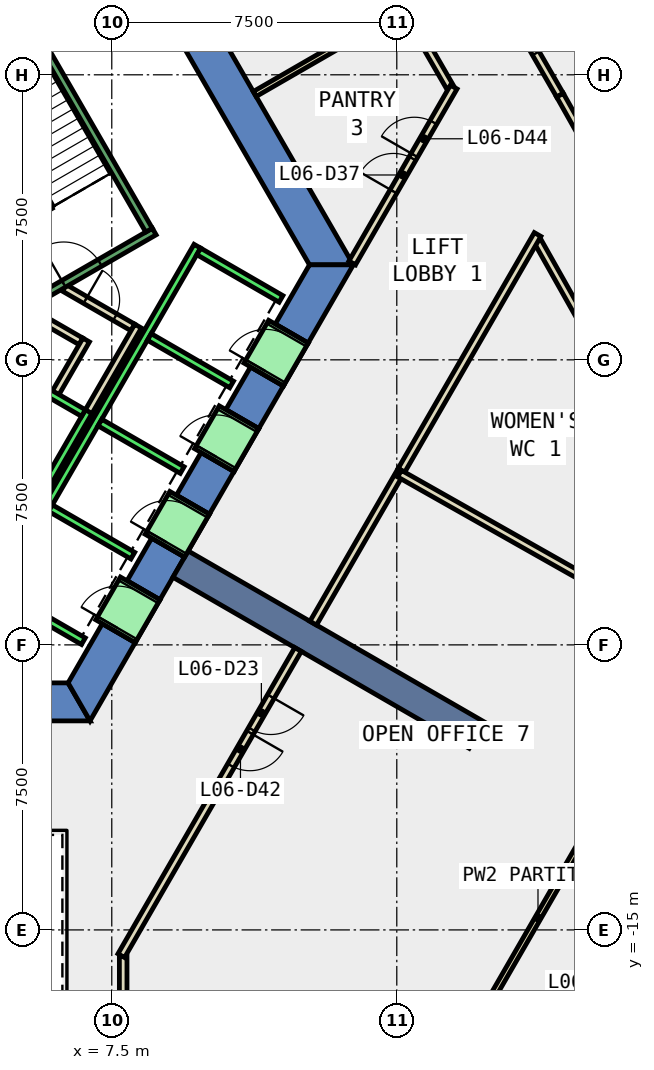
"""IFC4 building model, lengths in metres.
Left out: names, types, materials, properties, quantities, classifications, styles, units other than length and angle.
Written with IfcOpenShell. Run it as: python <this file> out.ifc"""

import sys

from ifc_helpers import new_model, si_unit, direction, frame, frame_2d, origin, place, context, subcontext, project, spatial, polyline, rectangle, outline, extrude, element, fill, save


model = new_model("IFC4")
c1 = context("Model", 3, precision=1e-05, world=origin(), true_north=direction((0.0, 1.0)))
c2 = subcontext(c1, "Body", "Model", "MODEL_VIEW")
j1 = project(units=[si_unit("LENGTHUNIT", "METRE"), si_unit("PLANEANGLEUNIT", "RADIAN")], contexts=[c1])
p1 = place(None, origin())
s1 = spatial("IfcSite", under=j1, at=p1, CompositionType="ELEMENT")
p2 = place(p1, origin())
s2 = spatial("IfcBuilding", under=s1, at=p2, CompositionType="ELEMENT")
p3 = place(p2, frame((0.0, 0.0, 35.0)))
s3 = spatial("IfcBuildingStorey", under=s2, at=p3, CompositionType="ELEMENT", Elevation=35.0)
p4 = place(p3, frame((0.0, 0.0, -0.6)))
e1 = element("IfcWall", 1, at=p4, inside=s3, PredefinedType="SHEAR", context=c2, shape_type="SweptSolid", body=[
    extrude(outline(polyline([(8.517, 11.748), (7.651, 11.248), (12.702, 2.5), (13.856, 2.5), (8.517, 11.748)])), origin(), (0.0, 0.0, 1.0), 4.4),
])
p5 = place(p3, frame((0.0, 0.0, -0.6)))
e2 = element("IfcWall", 2, at=p5, inside=s3, PredefinedType="SHEAR", context=c2, shape_type="SweptSolid", body=[
    extrude(outline(polyline([(5.75, -8.5), (5.75, -9.5), (6.928, -9.5), (6.351, -8.5), (5.75, -8.5)])), origin(), (0.0, 0.0, 1.0), 4.4),
])
p6 = place(p3, frame((0.0, 0.0, -0.6)))
e3 = element("IfcWall", 3, at=p6, inside=s3, PredefinedType="SHEAR", context=c2, shape_type="SweptSolid", body=[
    extrude(outline(polyline([(8.117, -7.44), (7.252, -6.94), (6.351, -8.5), (6.928, -9.5), (8.117, -7.44)])), origin(), (0.0, 0.0, 1.0), 4.4),
])
p7 = place(p3, frame((0.0, 0.0, -0.6)))
e4 = element("IfcWall", 4, at=p7, inside=s3, PredefinedType="SHEAR", context=c2, shape_type="SweptSolid", body=[
    extrude(outline(polyline([(9.417, -5.189), (8.551, -4.689), (7.902, -5.814), (8.767, -6.314), (9.417, -5.189)])), origin(), (0.0, 0.0, 1.0), 4.4),
])
p8 = place(p3, frame((0.0, 0.0, -0.6)))
e5 = element("IfcWall", 5, at=p8, inside=s3, PredefinedType="SHEAR", context=c2, shape_type="SweptSolid", body=[
    extrude(outline(polyline([(10.717, -2.937), (9.851, -2.437), (9.201, -3.563), (10.067, -4.063), (10.717, -2.937)])), origin(), (0.0, 0.0, 1.0), 4.4),
])
p9 = place(p3, frame((0.0, 0.0, -0.6)))
e6 = element("IfcWall", 6, at=p9, inside=s3, PredefinedType="SHEAR", context=c2, shape_type="SweptSolid", body=[
    extrude(outline(polyline([(12.017, -0.686), (11.151, -0.186), (10.501, -1.311), (11.367, -1.811), (12.017, -0.686)])), origin(), (0.0, 0.0, 1.0), 4.4),
])
p10 = place(p3, frame((0.0, 0.0, -0.6)))
e7 = element("IfcWall", 7, at=p10, inside=s3, PredefinedType="SHEAR", context=c2, shape_type="SweptSolid", body=[
    extrude(outline(polyline([(11.801, 0.94), (12.667, 0.44), (13.856, 2.5), (12.702, 2.5), (11.801, 0.94)])), origin(), (0.0, 0.0, 1.0), 4.4),
])
p11 = place(p3, frame((0.0, 0.0, 3.6)))
e8 = element("IfcWall", 8, at=p11, inside=s3, PredefinedType="SHEAR", context=c2, shape_type="SweptSolid", body=[
    extrude(outline(polyline([(8.767, -6.314), (7.902, -5.814), (7.252, -6.94), (8.117, -7.44), (8.767, -6.314)])), origin(), (0.0, 0.0, 1.0), 0.2),
])
p12 = place(p3, frame((0.0, 0.0, 3.6)))
e9 = element("IfcWall", 9, at=p12, inside=s3, PredefinedType="SHEAR", context=c2, shape_type="SweptSolid", body=[
    extrude(outline(polyline([(10.067, -4.063), (9.201, -3.563), (8.551, -4.689), (9.417, -5.189), (10.067, -4.063)])), origin(), (0.0, 0.0, 1.0), 0.2),
])
p13 = place(p3, frame((0.0, 0.0, 3.6)))
e10 = element("IfcWall", 10, at=p13, inside=s3, PredefinedType="SHEAR", context=c2, shape_type="SweptSolid", body=[
    extrude(outline(polyline([(11.367, -1.811), (10.501, -1.311), (9.851, -2.437), (10.717, -2.937), (11.367, -1.811)])), origin(), (0.0, 0.0, 1.0), 0.2),
])
p14 = place(p3, frame((0.0, 0.0, 3.6)))
e11 = element("IfcWall", 11, at=p14, inside=s3, PredefinedType="SHEAR", context=c2, shape_type="SweptSolid", body=[
    extrude(outline(polyline([(12.667, 0.44), (11.801, 0.94), (11.151, -0.186), (12.017, -0.686), (12.667, 0.44)])), origin(), (0.0, 0.0, 1.0), 0.2),
])
p15 = place(p3, frame((9.31, -5.375, -0.6), z_axis=(0.0, 0.0, 1.0), x_axis=(0.866017533419, -0.500013631625, 0.0)))
e12 = element("IfcWall", 12, at=p15, inside=s3, PredefinedType="SHEAR", context=c2, shape_type="SweptSolid", body=[
    extrude(rectangle(XDim=9.0, YDim=0.8, at=frame_2d((4.5, 0.0))), origin(), (0.0, 0.0, 1.0), 4.4),
])
p16 = place(p3, frame((16.399, 7.178, 0.0), z_axis=(0.0, 0.0, 1.0), x_axis=(-0.499873332494, 0.866098522953, 0.0)))
e13 = element("IfcWall", 13, at=p16, inside=s3, PredefinedType="PARTITIONING", context=c2, shape_type="SweptSolid", body=[
    extrude(rectangle(XDim=2.334, YDim=0.2, at=frame_2d((1.167, 0.0))), origin(), (0.0, 0.0, 1.0), 3.8),
])
p17 = place(p3, frame((20.751, -0.505, 0.0), z_axis=(0.0, 0.0, 1.0), x_axis=(-0.491284712602, 0.870999041999, 0.0)))
e14 = element("IfcWall", 14, at=p17, inside=s3, PredefinedType="PARTITIONING", context=c2, shape_type="SweptSolid", body=[
    extrude(rectangle(XDim=4.166, YDim=0.2, at=frame_2d((2.083, 0.0))), origin(), (0.0, 0.0, 1.0), 3.8),
])
p18 = place(p3, frame((17.524, 10.031, 0.0), z_axis=(0.0, 0.0, 1.0), x_axis=(0.499861717316, -0.86610522661, 0.0)))
e15 = element("IfcWall", 15, at=p18, inside=s3, PredefinedType="PARTITIONING", context=c2, shape_type="SweptSolid", body=[
    extrude(rectangle(XDim=3.541, YDim=0.2, at=frame_2d((1.771, 0.0))), origin(), (0.0, 0.0, 1.0), 3.8),
])
p19 = place(p18, frame((1.27, 0.0, 0.0)))
e16 = element("IfcOpeningElement", 16, at=p19, cuts=e15, PredefinedType="OPENING", context=c2, shape_type="SweptSolid", body=[
    extrude(rectangle(XDim=1.0, YDim=2.1, at=frame_2d((0.5, 1.05))), frame((0.0, 0.11, 0.0), z_axis=(0.0, -1.0, 0.0), x_axis=(1.0, 0.0, 0.0)), (0.0, 0.0, 1.0), 0.22),
])
p20 = place(p3, frame((19.294, 6.964, 0.0), z_axis=(0.0, 0.0, 1.0), x_axis=(0.491148159943, -0.871076050058, 0.0)))
e17 = element("IfcWall", 17, at=p20, inside=s3, PredefinedType="PARTITIONING", context=c2, shape_type="SweptSolid", body=[
    extrude(rectangle(XDim=3.541, YDim=0.2, at=frame_2d((1.771, 0.0))), origin(), (0.0, 0.0, 1.0), 3.8),
])
p21 = place(p3, frame((5.499, 1.172, 0.0), z_axis=(0.0, 0.0, 1.0), x_axis=(0.866333505267, -0.499465972466, 0.0)))
e18 = element("IfcWall", 18, at=p21, inside=s3, PredefinedType="PARTITIONING", context=c2, shape_type="SweptSolid", body=[
    extrude(rectangle(XDim=1.374, YDim=0.2, at=frame_2d((0.687, 0.0))), origin(), (0.0, 0.0, 1.0), 3.8),
])
p22 = place(p3, frame((6.826, 0.522, 0.0), z_axis=(0.0, 0.0, 1.0), x_axis=(-0.500016722714, -0.866015748706, 0.0)))
e19 = element("IfcWall", 19, at=p22, inside=s3, PredefinedType="PARTITIONING", context=c2, shape_type="SweptSolid", body=[
    extrude(rectangle(XDim=1.7, YDim=0.2, at=frame_2d((0.85, 0.0))), origin(), (0.0, 0.0, 1.0), 3.8),
])
p23 = place(p3, frame((6.25, 1.894, 0.0), z_axis=(0.0, 0.0, 1.0), x_axis=(0.866043184279, -0.499969202016, 0.0)))
e20 = element("IfcWall", 20, at=p23, inside=s3, PredefinedType="PARTITIONING", context=c2, shape_type="SweptSolid", body=[
    extrude(rectangle(XDim=2.084, YDim=0.2, at=frame_2d((1.042, 0.0))), origin(), (0.0, 0.0, 1.0), 3.8),
])
p24 = place(p23, frame((0.642, 0.0, 0.0)))
e21 = element("IfcOpeningElement", 21, at=p24, cuts=e20, PredefinedType="OPENING", context=c2, shape_type="SweptSolid", body=[
    extrude(rectangle(XDim=0.9, YDim=2.1, at=frame_2d((0.45, 1.05))), frame((0.0, 0.11, 0.0), z_axis=(0.0, -1.0, 0.0), x_axis=(1.0, 0.0, 0.0)), (0.0, 0.0, 1.0), 0.22),
])
p25 = place(p3, frame((8.192, 0.888, 0.0), z_axis=(0.0, 0.0, 1.0), x_axis=(-0.499940625693, -0.866059680843, 0.0)))
e22 = element("IfcWall", 22, at=p25, inside=s3, PredefinedType="PARTITIONING", context=c2, shape_type="SweptSolid", body=[
    extrude(rectangle(XDim=2.68, YDim=0.2, at=frame_2d((1.34, 0.0))), origin(), (0.0, 0.0, 1.0), 3.8),
])
p26 = place(p3, frame((15.281, 9.315, 0.0), z_axis=(0.0, 0.0, 1.0), x_axis=(-0.86601742213, -0.500013824377, 0.0)))
e23 = element("IfcWall", 23, at=p26, inside=s3, PredefinedType="PARTITIONING", context=c2, shape_type="SweptSolid", body=[
    extrude(rectangle(XDim=4.642, YDim=0.15, at=frame_2d((2.321, 0.0))), origin(), (0.0, 0.0, 1.0), 3.8),
])
p27 = place(p3, frame((13.827, 2.55, 0.0), z_axis=(0.0, 0.0, 1.0), x_axis=(0.50002563942, 0.866010600352, 0.0)))
e24 = element("IfcWall", 24, at=p27, inside=s3, PredefinedType="PARTITIONING", context=c2, shape_type="SweptSolid", body=[
    extrude(rectangle(XDim=5.344, YDim=0.2, at=frame_2d((2.672, 0.0))), origin(), (0.0, 0.0, 1.0), 3.8),
])
p28 = place(p27, frame((2.172, 0.0, 0.0)))
e25 = element("IfcOpeningElement", 25, at=p28, cuts=e24, PredefinedType="OPENING", context=c2, shape_type="SweptSolid", body=[
    extrude(rectangle(XDim=1.0, YDim=2.1, at=frame_2d((0.5, 1.05))), frame((0.0, 0.11, 0.0), z_axis=(0.0, -1.0, 0.0), x_axis=(1.0, 0.0, 0.0)), (0.0, 0.0, 1.0), 0.22),
])
p29 = place(p27, frame((3.272, 0.0, 0.0)))
e26 = element("IfcOpeningElement", 26, at=p29, cuts=e24, PredefinedType="OPENING", context=c2, shape_type="SweptSolid", body=[
    extrude(rectangle(XDim=1.0, YDim=2.1, at=frame_2d((0.5, 1.05))), frame((0.0, 0.11, 0.0), z_axis=(0.0, -1.0, 0.0), x_axis=(1.0, 0.0, 0.0)), (0.0, 0.0, 1.0), 0.22),
])
p30 = place(p3, frame((7.8, -15.69, 0.0), z_axis=(0.0, 0.0, 1.0), x_axis=(0.0, -1.0, 0.0)))
e27 = element("IfcWall", 27, at=p30, inside=s3, PredefinedType="PARTITIONING", context=c2, shape_type="SweptSolid", body=[
    extrude(rectangle(XDim=1.967, YDim=0.2, at=frame_2d((0.983, 0.0))), origin(), (0.0, 0.0, 1.0), 3.8),
])
p31 = place(p3, frame((15.122, -2.908, 0.0), z_axis=(0.0, 0.0, 1.0), x_axis=(-0.499922740561, -0.866070004948, 0.0)))
e28 = element("IfcWall", 28, at=p31, inside=s3, PredefinedType="PARTITIONING", context=c2, shape_type="SweptSolid", body=[
    extrude(rectangle(XDim=4.643, YDim=0.2, at=frame_2d((2.321, 0.0))), origin(), (0.0, 0.0, 1.0), 3.8),
])
p32 = place(p3, frame((18.705, 3.298, 0.0), z_axis=(0.0, 0.0, 1.0), x_axis=(-0.499993769413, -0.866029000986, 0.0)))
e29 = element("IfcWall", 29, at=p32, inside=s3, PredefinedType="PARTITIONING", context=c2, shape_type="SweptSolid", body=[
    extrude(rectangle(XDim=7.166, YDim=0.2, at=frame_2d((3.583, 0.0))), origin(), (0.0, 0.0, 1.0), 3.8),
])
p33 = place(p3, frame((15.072, -2.994, 0.0), z_axis=(0.0, 0.0, 1.0), x_axis=(0.87054185148, -0.49209438609, 0.0)))
e30 = element("IfcWall", 30, at=p33, inside=s3, PredefinedType="PARTITIONING", context=c2, shape_type="SweptSolid", body=[
    extrude(rectangle(XDim=9.1, YDim=0.2, at=frame_2d((4.55, 0.0))), origin(), (0.0, 0.0, 1.0), 3.8),
])
p34 = place(p3, frame((20.445, -11.688, 0.0), z_axis=(0.0, 0.0, 1.0), x_axis=(-0.500010633597, -0.866019264387, 0.0)))
e31 = element("IfcWall", 31, at=p34, inside=s3, PredefinedType="PARTITIONING", context=c2, shape_type="SweptSolid", body=[
    extrude(rectangle(XDim=6.918, YDim=0.15, at=frame_2d((3.459, 0.0))), origin(), (0.0, 0.0, 1.0), 3.8),
])
p35 = place(p3, frame((12.401, -7.621, 0.0), z_axis=(0.0, 0.0, 1.0), x_axis=(-0.499983724212, -0.866034800411, 0.0)))
e32 = element("IfcWall", 32, at=p35, inside=s3, PredefinedType="PARTITIONING", context=c2, shape_type="SweptSolid", body=[
    extrude(rectangle(XDim=9.302, YDim=0.2, at=frame_2d((4.651, 0.0))), origin(), (0.0, 0.0, 1.0), 3.8),
])
p36 = place(p35, frame((1.429, 0.0, 0.0)))
e33 = element("IfcOpeningElement", 33, at=p36, cuts=e32, PredefinedType="OPENING", context=c2, shape_type="SweptSolid", body=[
    extrude(rectangle(XDim=1.0, YDim=2.1, at=frame_2d((0.5, 1.05))), frame((0.0, 0.11, 0.0), z_axis=(0.0, -1.0, 0.0), x_axis=(1.0, 0.0, 0.0)), (0.0, 0.0, 1.0), 0.22),
])
p37 = place(p35, frame((2.529, 0.0, 0.0)))
e34 = element("IfcOpeningElement", 34, at=p37, cuts=e32, PredefinedType="OPENING", context=c2, shape_type="SweptSolid", body=[
    extrude(rectangle(XDim=1.0, YDim=2.1, at=frame_2d((0.5, 1.05))), frame((0.0, 0.11, 0.0), z_axis=(0.0, -1.0, 0.0), x_axis=(1.0, 0.0, 0.0)), (0.0, 0.0, 1.0), 0.22),
])
p38 = place(p3, frame((5.492, -3.788, 0.0), z_axis=(0.0, 0.0, 1.0), x_axis=(0.500011755427, 0.866018616679, 0.0)))
e35 = element("IfcWall", 35, at=p38, inside=s3, PredefinedType="STANDARD", context=c2, shape_type="SweptSolid", body=[
    extrude(rectangle(XDim=2.8, YDim=0.2, at=frame_2d((1.4, 0.0))), origin(), (0.0, 0.0, 1.0), 3.8),
])
p39 = place(p3, frame((4.677, -0.2, 0.0), z_axis=(0.0, 0.0, 1.0), x_axis=(0.865973769406, -0.500089422704, 0.0)))
e36 = element("IfcWall", 36, at=p39, inside=s3, PredefinedType="STANDARD", context=c2, shape_type="SweptSolid", body=[
    extrude(rectangle(XDim=2.399, YDim=0.2, at=frame_2d((1.2, 0.0))), origin(), (0.0, 0.0, 1.0), 3.8),
])
p40 = place(p3, frame((4.451, -6.19, 0.0), z_axis=(0.0, 0.0, 1.0), x_axis=(0.50000090737, 0.866024879913, 0.0)))
e37 = element("IfcWall", 37, at=p40, inside=s3, PredefinedType="STANDARD", context=c2, shape_type="SweptSolid", body=[
    extrude(rectangle(XDim=10.6, YDim=0.2, at=frame_2d((5.3, 0.0))), origin(), (0.0, 0.0, 1.0), 3.8),
])
for number, where, z_axis, x_axis in (
    (38, (4.588, -6.153, 0.0), (0.0, 0.0, 1.0), (0.866, -0.5, 0.0)),
    (39, (5.888, -3.902, 0.0), (0.0, 0.0, 1.0), (0.866, -0.5, 0.0)),
    (40, (7.188, -1.65, 0.0), (0.0, 0.0, 1.0), (0.866, -0.5, 0.0)),
    (41, (8.488, 0.602, 0.0), (0.0, 0.0, 1.0), (0.866, -0.5, 0.0)),
):
    element("IfcWall", number, at=place(p3, frame(where, z_axis=z_axis, x_axis=x_axis)), inside=s3, PredefinedType="STANDARD", context=c2, shape_type="SweptSolid", body=[
        extrude(rectangle(XDim=2.5, YDim=0.2, at=frame_2d((1.25, 0.0))), origin(), (0.0, 0.0, 1.0), 3.8),
    ])
p41 = place(p3, frame((9.788, 2.853, 0.0), z_axis=(0.0, 0.0, 1.0), x_axis=(0.865998541277, -0.500046524342, 0.0)))
e42 = element("IfcWall", 42, at=p41, inside=s3, PredefinedType="STANDARD", context=c2, shape_type="SweptSolid", body=[
    extrude(rectangle(XDim=2.5, YDim=0.2, at=frame_2d((1.25, 0.0))), origin(), (0.0, 0.0, 1.0), 3.8),
])
p42 = place(p3, frame((7.598, -7.14, 0.0), z_axis=(0.0, 0.0, 1.0), x_axis=(0.500362116554, 0.865816234728, 0.0)))
e43 = element("IfcWall", 43, at=p42, inside=s3, PredefinedType="STANDARD", context=c2, shape_type="SweptSolid", body=[
    extrude(rectangle(XDim=1.299, YDim=1.2, at=frame_2d((0.65, 0.0))), origin(), (0.0, 0.0, 1.0), 2.4),
])
p43 = place(p42, frame((0.1, 0.0, 0.0)))
e44 = element("IfcOpeningElement", 44, at=p43, cuts=e43, PredefinedType="OPENING", context=c2, shape_type="SweptSolid", body=[
    extrude(rectangle(XDim=1.1, YDim=2.3, at=frame_2d((0.55, 1.15))), frame((0.0, 0.61, 0.0), z_axis=(0.0, -1.0, 0.0), x_axis=(1.0, 0.0, 0.0)), (0.0, 0.0, 1.0), 1.22),
])
p44 = place(p3, frame((8.898, -4.889, 0.0), z_axis=(0.0, 0.0, 1.0), x_axis=(0.500036693733, 0.866004217611, 0.0)))
e45 = element("IfcWall", 45, at=p44, inside=s3, PredefinedType="STANDARD", context=c2, shape_type="SweptSolid", body=[
    extrude(rectangle(XDim=1.3, YDim=1.2, at=frame_2d((0.65, 0.0))), origin(), (0.0, 0.0, 1.0), 2.4),
])
p45 = place(p44, frame((0.1, 0.0, 0.0)))
e46 = element("IfcOpeningElement", 46, at=p45, cuts=e45, PredefinedType="OPENING", context=c2, shape_type="SweptSolid", body=[
    extrude(rectangle(XDim=1.1, YDim=2.3, at=frame_2d((0.55, 1.15))), frame((0.0, 0.61, 0.0), z_axis=(0.0, -1.0, 0.0), x_axis=(1.0, 0.0, 0.0)), (0.0, 0.0, 1.0), 1.22),
])
p46 = place(p3, frame((10.198, -2.637, 0.0), z_axis=(0.0, 0.0, 1.0), x_axis=(0.49989585183, 0.866085525409, 0.0)))
e47 = element("IfcWall", 47, at=p46, inside=s3, PredefinedType="STANDARD", context=c2, shape_type="SweptSolid", body=[
    extrude(rectangle(XDim=1.3, YDim=1.2, at=frame_2d((0.65, 0.0))), origin(), (0.0, 0.0, 1.0), 2.4),
])
p47 = place(p46, frame((0.1, 0.0, 0.0)))
e48 = element("IfcOpeningElement", 48, at=p47, cuts=e47, PredefinedType="OPENING", context=c2, shape_type="SweptSolid", body=[
    extrude(rectangle(XDim=1.1, YDim=2.3, at=frame_2d((0.55, 1.15))), frame((0.0, 0.61, 0.0), z_axis=(0.0, -1.0, 0.0), x_axis=(1.0, 0.0, 0.0)), (0.0, 0.0, 1.0), 1.22),
])
p48 = place(p3, frame((11.498, -0.385, 0.0), z_axis=(0.0, 0.0, 1.0), x_axis=(0.500221244143, 0.865897630733, 0.0)))
e49 = element("IfcWall", 49, at=p48, inside=s3, PredefinedType="STANDARD", context=c2, shape_type="SweptSolid", body=[
    extrude(rectangle(XDim=1.299, YDim=1.2, at=frame_2d((0.65, 0.0))), origin(), (0.0, 0.0, 1.0), 2.4),
])
p49 = place(p48, frame((0.1, 0.0, 0.0)))
e50 = element("IfcOpeningElement", 50, at=p49, cuts=e49, PredefinedType="OPENING", context=c2, shape_type="SweptSolid", body=[
    extrude(rectangle(XDim=1.1, YDim=2.3, at=frame_2d((0.55, 1.15))), frame((0.0, 0.61, 0.0), z_axis=(0.0, -1.0, 0.0), x_axis=(1.0, 0.0, 0.0)), (0.0, 0.0, 1.0), 1.22),
])
p50 = place(p3, frame((4.806, 1.176, 0.0), z_axis=(0.0, 0.0, 1.0), x_axis=(0.866059941101, 0.499940174841, 0.0)))
e51 = element("IfcWall", 51, at=p50, inside=s3, PredefinedType="STANDARD", context=c2, shape_type="SweptSolid", body=[
    extrude(rectangle(XDim=4.4, YDim=0.2, at=frame_2d((2.2, 0.0))), origin(), (0.0, 0.0, 1.0), 3.8),
])
p51 = place(p50, frame((1.65, 0.0, 0.0)))
e52 = element("IfcOpeningElement", 52, at=p51, cuts=e51, PredefinedType="OPENING", context=c2, shape_type="SweptSolid", body=[
    extrude(rectangle(XDim=1.1, YDim=2.2, at=frame_2d((0.55, 1.1))), frame((0.0, 0.11, 0.0), z_axis=(0.0, -1.0, 0.0), x_axis=(1.0, 0.0, 0.0)), (0.0, 0.0, 1.0), 0.22),
])
p52 = place(p3, frame((8.48, 3.412, 0.0), z_axis=(0.0, 0.0, 1.0), x_axis=(-0.499978703459, 0.866037698999, 0.0)))
e53 = element("IfcWall", 53, at=p52, inside=s3, PredefinedType="STANDARD", context=c2, shape_type="SweptSolid", body=[
    extrude(rectangle(XDim=6.9, YDim=0.2, at=frame_2d((3.45, 0.0))), origin(), (0.0, 0.0, 1.0), 3.8),
])
p53 = place(p19, origin())
e54 = element("IfcDoor", 54, at=p53, inside=s3, OperationType="SINGLE_SWING_LEFT", PredefinedType="DOOR", context=c2, shape_type="SweptSolid", body=[
    extrude(rectangle(XDim=1.0, YDim=2.1, at=frame_2d((0.5, 1.05))), frame((0.0, 0.025, 0.0), z_axis=(0.0, -1.0, 0.0), x_axis=(1.0, 0.0, 0.0)), (0.0, 0.0, 1.0), 0.05),
])
fill(e16, e54)
p54 = place(p36, origin())
e55 = element("IfcDoor", 55, at=p54, inside=s3, OperationType="SINGLE_SWING_LEFT", PredefinedType="DOOR", context=c2, shape_type="SweptSolid", body=[
    extrude(rectangle(XDim=1.0, YDim=2.1, at=frame_2d((0.5, 1.05))), frame((0.0, 0.025, 0.0), z_axis=(0.0, -1.0, 0.0), x_axis=(1.0, 0.0, 0.0)), (0.0, 0.0, 1.0), 0.05),
])
fill(e33, e55)
p55 = place(p28, origin())
e56 = element("IfcDoor", 56, at=p55, inside=s3, OperationType="SINGLE_SWING_LEFT", PredefinedType="DOOR", context=c2, shape_type="SweptSolid", body=[
    extrude(rectangle(XDim=1.0, YDim=2.1, at=frame_2d((0.5, 1.05))), frame((0.0, 0.025, 0.0), z_axis=(0.0, -1.0, 0.0), x_axis=(1.0, 0.0, 0.0)), (0.0, 0.0, 1.0), 0.05),
])
fill(e25, e56)
p56 = place(p24, origin())
e57 = element("IfcDoor", 57, at=p56, inside=s3, OperationType="SINGLE_SWING_LEFT", PredefinedType="DOOR", context=c2, shape_type="SweptSolid", body=[
    extrude(rectangle(XDim=0.9, YDim=2.1, at=frame_2d((0.45, 1.05))), frame((0.0, 0.025, 0.0), z_axis=(0.0, -1.0, 0.0), x_axis=(1.0, 0.0, 0.0)), (0.0, 0.0, 1.0), 0.05),
])
fill(e21, e57)
p57 = place(p37, origin())
e58 = element("IfcDoor", 58, at=p57, inside=s3, OperationType="SINGLE_SWING_RIGHT", PredefinedType="DOOR", context=c2, shape_type="SweptSolid", body=[
    extrude(rectangle(XDim=1.0, YDim=2.1, at=frame_2d((0.5, 1.05))), frame((0.0, 0.025, 0.0), z_axis=(0.0, -1.0, 0.0), x_axis=(1.0, 0.0, 0.0)), (0.0, 0.0, 1.0), 0.05),
])
fill(e34, e58)
p58 = place(p29, origin())
e59 = element("IfcDoor", 59, at=p58, inside=s3, OperationType="SINGLE_SWING_RIGHT", PredefinedType="DOOR", context=c2, shape_type="SweptSolid", body=[
    extrude(rectangle(XDim=1.0, YDim=2.1, at=frame_2d((0.5, 1.05))), frame((0.0, 0.025, 0.0), z_axis=(0.0, -1.0, 0.0), x_axis=(1.0, 0.0, 0.0)), (0.0, 0.0, 1.0), 0.05),
])
fill(e26, e59)
p59 = place(p43, origin())
e60 = element("IfcDoor", 60, at=p59, inside=s3, OperationType="SLIDING_TO_LEFT", PredefinedType="DOOR", context=c2, shape_type="SweptSolid", body=[
    extrude(rectangle(XDim=1.1, YDim=2.3, at=frame_2d((0.55, 1.15))), frame((0.0, 0.025, 0.0), z_axis=(0.0, -1.0, 0.0), x_axis=(1.0, 0.0, 0.0)), (0.0, 0.0, 1.0), 0.05),
])
fill(e44, e60)
p60 = place(p45, origin())
e61 = element("IfcDoor", 61, at=p60, inside=s3, OperationType="SLIDING_TO_LEFT", PredefinedType="DOOR", context=c2, shape_type="SweptSolid", body=[
    extrude(rectangle(XDim=1.1, YDim=2.3, at=frame_2d((0.55, 1.15))), frame((0.0, 0.025, 0.0), z_axis=(0.0, -1.0, 0.0), x_axis=(1.0, 0.0, 0.0)), (0.0, 0.0, 1.0), 0.05),
])
fill(e46, e61)
p61 = place(p47, origin())
e62 = element("IfcDoor", 62, at=p61, inside=s3, OperationType="SLIDING_TO_LEFT", PredefinedType="DOOR", context=c2, shape_type="SweptSolid", body=[
    extrude(rectangle(XDim=1.1, YDim=2.3, at=frame_2d((0.55, 1.15))), frame((0.0, 0.025, 0.0), z_axis=(0.0, -1.0, 0.0), x_axis=(1.0, 0.0, 0.0)), (0.0, 0.0, 1.0), 0.05),
])
fill(e48, e62)
p62 = place(p49, origin())
e63 = element("IfcDoor", 63, at=p62, inside=s3, OperationType="SLIDING_TO_LEFT", PredefinedType="DOOR", context=c2, shape_type="SweptSolid", body=[
    extrude(rectangle(XDim=1.1, YDim=2.3, at=frame_2d((0.55, 1.15))), frame((0.0, 0.025, 0.0), z_axis=(0.0, -1.0, 0.0), x_axis=(1.0, 0.0, 0.0)), (0.0, 0.0, 1.0), 0.05),
])
fill(e50, e63)
p63 = place(p51, origin())
e64 = element("IfcDoor", 64, at=p63, inside=s3, OperationType="SINGLE_SWING_LEFT", PredefinedType="DOOR", context=c2, shape_type="SweptSolid", body=[
    extrude(rectangle(XDim=1.1, YDim=2.2, at=frame_2d((0.55, 1.1))), frame((0.0, 0.025, 0.0), z_axis=(0.0, -1.0, 0.0), x_axis=(1.0, 0.0, 0.0)), (0.0, 0.0, 1.0), 0.05),
])
fill(e52, e64)
save(model, sys.argv[1])
